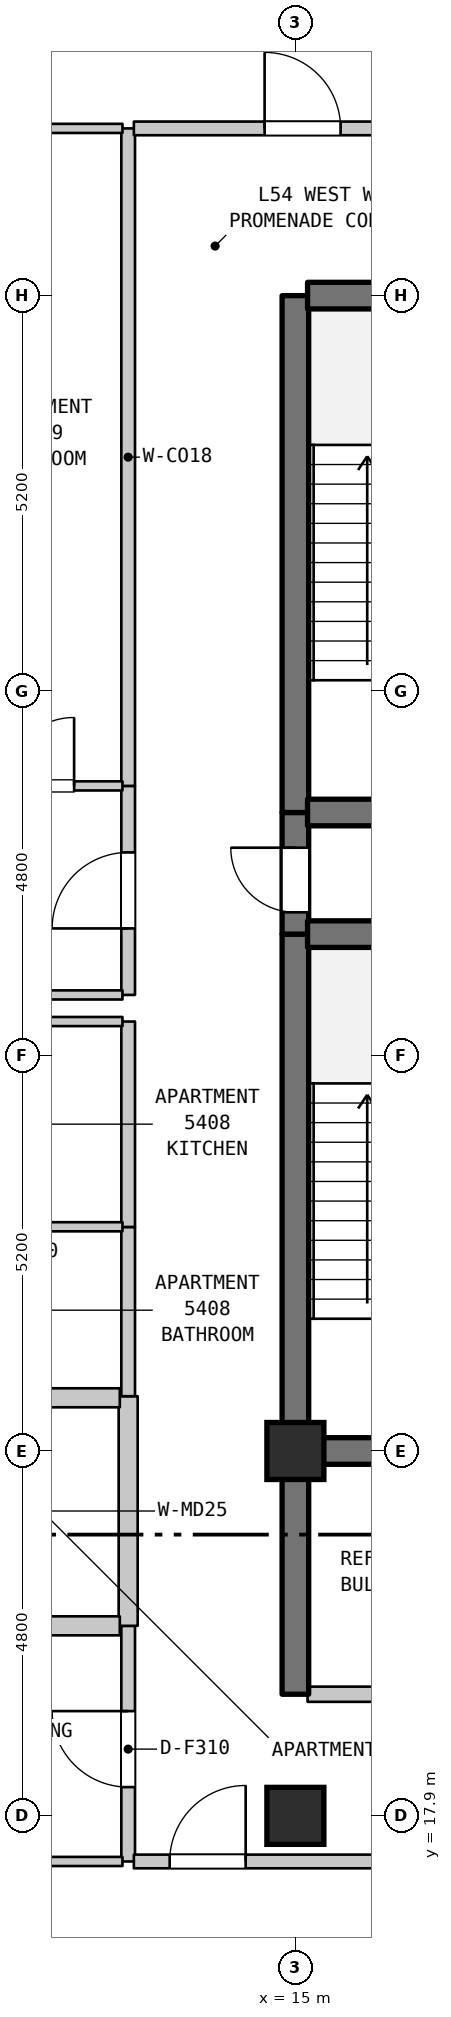
"""IFC4 building model, lengths in metres.
Left out: names, types, materials, properties, quantities, classifications, styles, units other than length and angle.
Written with IfcOpenShell. Run it as: python <this file> out.ifc"""

import sys

from ifc_helpers import new_model, si_unit, direction, frame, frame_2d, origin, origin_2d, place, context, subcontext, project, spatial, rectangle, extrude, element, fill, save


model = new_model("IFC4")
c1 = context("Model", 3, precision=1e-05, world=origin(), true_north=direction((0.0, 1.0)))
c2 = subcontext(c1, "Body", "Model", "MODEL_VIEW")
j1 = project(units=[si_unit("LENGTHUNIT", "METRE"), si_unit("PLANEANGLEUNIT", "RADIAN")], contexts=[c1])
p1 = place(None, origin())
s1 = spatial("IfcSite", under=j1, at=p1, CompositionType="ELEMENT")
p2 = place(p1, origin())
s2 = spatial("IfcBuilding", under=s1, at=p2, CompositionType="ELEMENT")
p3 = place(p2, frame((0.0, 0.0, 218.0)))
s3 = spatial("IfcBuildingStorey", under=s2, at=p3, CompositionType="ELEMENT", Elevation=218.0)
for number, where, z_axis, x_axis in (
    (1, (15.0, 17.9, 0.0), (0.0, 0.0, 1.0), (1.0, 0.0, 0.0)),
    (2, (15.0, 22.7, 0.0), (0.0, 0.0, 1.0), (1.0, 0.0, 0.0)),
):
    element("IfcColumn", number, at=place(p3, frame(where, z_axis=z_axis, x_axis=x_axis)), inside=s3, PredefinedType="COLUMN", context=c2, shape_type="SweptSolid", body=[
        extrude(rectangle(XDim=0.75, YDim=0.75, at=origin_2d()), origin(), (0.0, 0.0, 1.0), 4.8),
    ])
p4 = place(p3, frame((12.8, 17.3, 0.0), z_axis=(0.0, 0.0, 1.0), x_axis=(0.0, 1.0, 0.0)))
e3 = element("IfcWall", 3, at=p4, inside=s3, PredefinedType="STANDARD", context=c2, shape_type="SweptSolid", body=[
    extrude(rectangle(XDim=3.1, YDim=0.18, at=frame_2d((1.55, 0.0))), origin(), (0.0, 0.0, 1.0), 4.49),
])
p5 = place(p4, frame((0.978, 0.0, 0.0)))
e4 = element("IfcOpeningElement", 4, at=p5, cuts=e3, PredefinedType="OPENING", context=c2, shape_type="SweptSolid", body=[
    extrude(rectangle(XDim=1.0, YDim=2.15, at=frame_2d((0.5, 1.075))), frame((0.0, 0.1, 0.0), z_axis=(0.0, -1.0, 0.0), x_axis=(1.0, 0.0, 0.0)), (0.0, 0.0, 1.0), 0.2),
])
p6 = place(p3, frame((12.8, 20.4, 0.0), z_axis=(0.0, 0.0, 1.0), x_axis=(0.0, 1.0, 0.0)))
e5 = element("IfcWall", 5, at=p6, inside=s3, PredefinedType="STANDARD", context=c2, shape_type="SweptSolid", body=[
    extrude(rectangle(XDim=3.021, YDim=0.25, at=frame_2d((1.51, 0.0))), origin(), (0.0, 0.0, 1.0), 4.49),
])
p7 = place(p3, frame((12.8, 23.421, 0.0), z_axis=(0.0, 0.0, 1.0), x_axis=(0.0, 1.0, 0.0)))
e6 = element("IfcWall", 6, at=p7, inside=s3, PredefinedType="STANDARD", context=c2, shape_type="SweptSolid", body=[
    extrude(rectangle(XDim=2.226, YDim=0.18, at=frame_2d((1.113, 0.0))), origin(), (0.0, 0.0, 1.0), 4.49),
])
p8 = place(p3, frame((12.8, 25.647, 0.0), z_axis=(0.0, 0.0, 1.0), x_axis=(0.0, 1.0, 0.0)))
e7 = element("IfcWall", 7, at=p8, inside=s3, PredefinedType="STANDARD", context=c2, shape_type="SweptSolid", body=[
    extrude(rectangle(XDim=2.703, YDim=0.18, at=frame_2d((1.352, 0.0))), origin(), (0.0, 0.0, 1.0), 4.49),
])
p9 = place(p3, frame((12.8, 28.7, 0.0), z_axis=(0.0, 0.0, 1.0), x_axis=(0.0, 1.0, 0.0)))
e8 = element("IfcWall", 8, at=p9, inside=s3, PredefinedType="STANDARD", context=c2, shape_type="SweptSolid", body=[
    extrude(rectangle(XDim=2.75, YDim=0.18, at=frame_2d((1.375, 0.0))), origin(), (0.0, 0.0, 1.0), 4.49),
])
p10 = place(p9, frame((0.875, 0.0, 0.0)))
e9 = element("IfcOpeningElement", 9, at=p10, cuts=e8, PredefinedType="OPENING", context=c2, shape_type="SweptSolid", body=[
    extrude(rectangle(XDim=1.0, YDim=2.15, at=frame_2d((0.5, 1.075))), frame((0.0, 0.1, 0.0), z_axis=(0.0, -1.0, 0.0), x_axis=(1.0, 0.0, 0.0)), (0.0, 0.0, 1.0), 0.2),
])
p11 = place(p3, frame((12.8, 31.45, 0.0), z_axis=(0.0, 0.0, 1.0), x_axis=(0.0, 1.0, 0.0)))
e10 = element("IfcWall", 10, at=p11, inside=s3, PredefinedType="STANDARD", context=c2, shape_type="SweptSolid", body=[
    extrude(rectangle(XDim=8.65, YDim=0.18, at=frame_2d((4.325, 0.0))), origin(), (0.0, 0.0, 1.0), 4.49),
])
p12 = place(p3, frame((15.0, 19.5, 0.0), z_axis=(0.0, 0.0, 1.0), x_axis=(0.0, 1.0, 0.0)))
e11 = element("IfcWall", 11, at=p12, inside=s3, PredefinedType="SHEAR", context=c2, shape_type="SweptSolid", body=[
    extrude(rectangle(XDim=3.2, YDim=0.35, at=frame_2d((1.6, 0.0))), origin(), (0.0, 0.0, 1.0), 4.49),
])
p13 = place(p3, frame((15.0, 22.7, 0.0), z_axis=(0.0, 0.0, 1.0), x_axis=(0.0, 1.0, 0.0)))
e12 = element("IfcWall", 12, at=p13, inside=s3, PredefinedType="SHEAR", context=c2, shape_type="SweptSolid", body=[
    extrude(rectangle(XDim=6.8, YDim=0.35, at=frame_2d((3.4, 0.0))), origin(), (0.0, 0.0, 1.0), 4.49),
])
p14 = place(p3, frame((15.0, 29.5, 0.0), z_axis=(0.0, 0.0, 1.0), x_axis=(0.0, 1.0, 0.0)))
e13 = element("IfcWall", 13, at=p14, inside=s3, PredefinedType="SHEAR", context=c2, shape_type="SweptSolid", body=[
    extrude(rectangle(XDim=1.6, YDim=0.35, at=frame_2d((0.8, 0.0))), origin(), (0.0, 0.0, 1.0), 4.49),
])
p15 = place(p14, frame((0.287, 0.0, 0.0)))
e14 = element("IfcOpeningElement", 14, at=p15, cuts=e13, PredefinedType="OPENING", context=c2, shape_type="SweptSolid", body=[
    extrude(rectangle(XDim=0.85, YDim=2.1, at=frame_2d((0.425, 1.05))), frame((0.0, 0.185, 0.0), z_axis=(0.0, -1.0, 0.0), x_axis=(1.0, 0.0, 0.0)), (0.0, 0.0, 1.0), 0.37),
])
p16 = place(p3, frame((15.0, 31.1, 0.0), z_axis=(0.0, 0.0, 1.0), x_axis=(0.0, 1.0, 0.0)))
e15 = element("IfcWall", 15, at=p16, inside=s3, PredefinedType="SHEAR", context=c2, shape_type="SweptSolid", body=[
    extrude(rectangle(XDim=6.8, YDim=0.35, at=frame_2d((3.4, 0.0))), origin(), (0.0, 0.0, 1.0), 4.49),
])
p17 = place(p3, frame((9.085, 17.3, 0.0), z_axis=(0.0, 0.0, 1.0), x_axis=(1.0, 0.0, 0.0)))
e16 = element("IfcWall", 16, at=p17, inside=s3, PredefinedType="PARTITIONING", context=c2, shape_type="SweptSolid", body=[
    extrude(rectangle(XDim=3.64, YDim=0.12, at=frame_2d((1.82, 0.0))), origin(), (0.0, 0.0, 1.0), 4.49),
])
p18 = place(p3, frame((12.875, 17.3, 0.0), z_axis=(0.0, 0.0, 1.0), x_axis=(1.0, 0.0, 0.0)))
e17 = element("IfcWall", 17, at=p18, inside=s3, PredefinedType="STANDARD", context=c2, shape_type="SweptSolid", body=[
    extrude(rectangle(XDim=3.28, YDim=0.18, at=frame_2d((1.64, 0.0))), origin(), (0.0, 0.0, 1.0), 4.49),
])
p19 = place(p18, frame((0.471, 0.0, 0.0)))
e18 = element("IfcOpeningElement", 18, at=p19, cuts=e17, PredefinedType="OPENING", context=c2, shape_type="SweptSolid", body=[
    extrude(rectangle(XDim=1.0, YDim=2.15, at=frame_2d((0.5, 1.075))), frame((0.0, 0.1, 0.0), z_axis=(0.0, -1.0, 0.0), x_axis=(1.0, 0.0, 0.0)), (0.0, 0.0, 1.0), 0.2),
])
p20 = place(p3, frame((15.16, 19.5, 0.0), z_axis=(0.0, 0.0, 1.0), x_axis=(1.0, 0.0, 0.0)))
e19 = element("IfcWall", 19, at=p20, inside=s3, PredefinedType="STANDARD", context=c2, shape_type="SweptSolid", body=[
    extrude(rectangle(XDim=3.68, YDim=0.2, at=frame_2d((1.84, 0.0))), origin(), (0.0, 0.0, 1.0), 4.49),
])
p21 = place(p20, frame((1.39, 0.0, 0.0)))
e20 = element("IfcOpeningElement", 20, at=p21, cuts=e19, PredefinedType="OPENING", context=c2, shape_type="SweptSolid", body=[
    extrude(rectangle(XDim=0.9, YDim=2.15, at=frame_2d((0.45, 1.075))), frame((0.0, 0.11, 0.0), z_axis=(0.0, -1.0, 0.0), x_axis=(1.0, 0.0, 0.0)), (0.0, 0.0, 1.0), 0.22),
])
p22 = place(p3, frame((10.66, 20.4, 0.0), z_axis=(0.0, 0.0, 1.0), x_axis=(1.0, 0.0, 0.0)))
e21 = element("IfcWall", 21, at=p22, inside=s3, PredefinedType="STANDARD", context=c2, shape_type="SweptSolid", body=[
    extrude(rectangle(XDim=2.03, YDim=0.25, at=frame_2d((1.015, 0.0))), origin(), (0.0, 0.0, 1.0), 4.49),
])
p23 = place(p3, frame((15.16, 22.7, 0.0), z_axis=(0.0, 0.0, 1.0), x_axis=(1.0, 0.0, 0.0)))
e22 = element("IfcWall", 22, at=p23, inside=s3, PredefinedType="SHEAR", context=c2, shape_type="SweptSolid", body=[
    extrude(rectangle(XDim=3.68, YDim=0.35, at=frame_2d((1.84, 0.0))), origin(), (0.0, 0.0, 1.0), 4.49),
])
p24 = place(p3, frame((10.66, 23.4, 0.0), z_axis=(0.0, 0.0, 1.0), x_axis=(1.0, 0.0, 0.0)))
e23 = element("IfcWall", 23, at=p24, inside=s3, PredefinedType="STANDARD", context=c2, shape_type="SweptSolid", body=[
    extrude(rectangle(XDim=2.03, YDim=0.25, at=frame_2d((1.015, 0.0))), origin(), (0.0, 0.0, 1.0), 4.49),
])
for number, where, z_axis, x_axis in (
    (24, (10.595, 25.65, 0.0), (0.0, 0.0, 1.0), (1.0, 0.0, 0.0)),
    (25, (10.595, 28.35, 0.0), (0.0, 0.0, 1.0), (1.0, 0.0, 0.0)),
):
    element("IfcWall", number, at=place(p3, frame(where, z_axis=z_axis, x_axis=x_axis)), inside=s3, PredefinedType="PARTITIONING", context=c2, shape_type="SweptSolid", body=[
        extrude(rectangle(XDim=2.13, YDim=0.12, at=frame_2d((1.065, 0.0))), origin(), (0.0, 0.0, 1.0), 4.49),
    ])
p25 = place(p3, frame((9.03, 28.7, 0.0), z_axis=(0.0, 0.0, 1.0), x_axis=(1.0, 0.0, 0.0)))
e26 = element("IfcWall", 26, at=p25, inside=s3, PredefinedType="PARTITIONING", context=c2, shape_type="SweptSolid", body=[
    extrude(rectangle(XDim=3.695, YDim=0.12, at=frame_2d((1.848, 0.0))), origin(), (0.0, 0.0, 1.0), 4.49),
])
for number, where, z_axis, x_axis in (
    (27, (15.16, 29.5, 0.0), (0.0, 0.0, 1.0), (1.0, 0.0, 0.0)),
    (28, (15.16, 31.1, 0.0), (0.0, 0.0, 1.0), (1.0, 0.0, 0.0)),
):
    element("IfcWall", number, at=place(p3, frame(where, z_axis=z_axis, x_axis=x_axis)), inside=s3, PredefinedType="SHEAR", context=c2, shape_type="SweptSolid", body=[
        extrude(rectangle(XDim=3.68, YDim=0.35, at=frame_2d((1.84, 0.0))), origin(), (0.0, 0.0, 1.0), 4.49),
    ])
p26 = place(p3, frame((10.523, 31.45, 0.0), z_axis=(0.0, 0.0, 1.0), x_axis=(1.0, 0.0, 0.0)))
e29 = element("IfcWall", 29, at=p26, inside=s3, PredefinedType="PARTITIONING", context=c2, shape_type="SweptSolid", body=[
    extrude(rectangle(XDim=2.202, YDim=0.12, at=frame_2d((1.101, 0.0))), origin(), (0.0, 0.0, 1.0), 4.49),
])
p27 = place(p26, frame((0.666, 0.0, 0.0)))
e30 = element("IfcOpeningElement", 30, at=p27, cuts=e29, PredefinedType="OPENING", context=c2, shape_type="SweptSolid", body=[
    extrude(rectangle(XDim=0.9, YDim=2.1, at=frame_2d((0.45, 1.05))), frame((0.0, 0.07, 0.0), z_axis=(0.0, -1.0, 0.0), x_axis=(1.0, 0.0, 0.0)), (0.0, 0.0, 1.0), 0.14),
])
p28 = place(p3, frame((15.16, 37.9, 0.0), z_axis=(0.0, 0.0, 1.0), x_axis=(1.0, 0.0, 0.0)))
e31 = element("IfcWall", 31, at=p28, inside=s3, PredefinedType="SHEAR", context=c2, shape_type="SweptSolid", body=[
    extrude(rectangle(XDim=3.68, YDim=0.35, at=frame_2d((1.84, 0.0))), origin(), (0.0, 0.0, 1.0), 4.49),
])
p29 = place(p3, frame((10.523, 40.1, 0.0), z_axis=(0.0, 0.0, 1.0), x_axis=(1.0, 0.0, 0.0)))
e32 = element("IfcWall", 32, at=p29, inside=s3, PredefinedType="PARTITIONING", context=c2, shape_type="SweptSolid", body=[
    extrude(rectangle(XDim=2.202, YDim=0.12, at=frame_2d((1.101, 0.0))), origin(), (0.0, 0.0, 1.0), 4.49),
])
p30 = place(p3, frame((12.875, 40.1, 0.0), z_axis=(0.0, 0.0, 1.0), x_axis=(1.0, 0.0, 0.0)))
e33 = element("IfcWall", 33, at=p30, inside=s3, PredefinedType="STANDARD", context=c2, shape_type="SweptSolid", body=[
    extrude(rectangle(XDim=4.61, YDim=0.18, at=frame_2d((2.305, 0.0))), origin(), (0.0, 0.0, 1.0), 4.49),
])
p31 = place(p30, frame((1.72, 0.0, 0.0)))
e34 = element("IfcOpeningElement", 34, at=p31, cuts=e33, PredefinedType="OPENING", context=c2, shape_type="SweptSolid", body=[
    extrude(rectangle(XDim=1.0, YDim=2.15, at=frame_2d((0.5, 1.075))), frame((0.0, 0.1, 0.0), z_axis=(0.0, -1.0, 0.0), x_axis=(1.0, 0.0, 0.0)), (0.0, 0.0, 1.0), 0.2),
])
p32 = place(p5, origin())
e35 = element("IfcDoor", 35, at=p32, inside=s3, OperationType="SINGLE_SWING_RIGHT", PredefinedType="DOOR", context=c2, shape_type="SweptSolid", body=[
    extrude(rectangle(XDim=1.0, YDim=2.15, at=frame_2d((0.5, 1.075))), frame((0.0, 0.025, 0.0), z_axis=(0.0, -1.0, 0.0), x_axis=(1.0, 0.0, 0.0)), (0.0, 0.0, 1.0), 0.05),
])
fill(e4, e35)
p33 = place(p10, origin())
e36 = element("IfcDoor", 36, at=p33, inside=s3, OperationType="SINGLE_SWING_LEFT", PredefinedType="DOOR", context=c2, shape_type="SweptSolid", body=[
    extrude(rectangle(XDim=1.0, YDim=2.15, at=frame_2d((0.5, 1.075))), frame((0.0, 0.025, 0.0), z_axis=(0.0, -1.0, 0.0), x_axis=(1.0, 0.0, 0.0)), (0.0, 0.0, 1.0), 0.05),
])
fill(e9, e36)
p34 = place(p15, origin())
e37 = element("IfcDoor", 37, at=p34, inside=s3, OperationType="SINGLE_SWING_RIGHT", PredefinedType="DOOR", context=c2, shape_type="SweptSolid", body=[
    extrude(rectangle(XDim=0.85, YDim=2.1, at=frame_2d((0.425, 1.05))), frame((0.0, 0.025, 0.0), z_axis=(0.0, -1.0, 0.0), x_axis=(1.0, 0.0, 0.0)), (0.0, 0.0, 1.0), 0.05),
])
fill(e14, e37)
p35 = place(p19, origin())
e38 = element("IfcDoor", 38, at=p35, inside=s3, OperationType="SINGLE_SWING_RIGHT", PredefinedType="DOOR", context=c2, shape_type="SweptSolid", body=[
    extrude(rectangle(XDim=1.0, YDim=2.15, at=frame_2d((0.5, 1.075))), frame((0.0, 0.025, 0.0), z_axis=(0.0, -1.0, 0.0), x_axis=(1.0, 0.0, 0.0)), (0.0, 0.0, 1.0), 0.05),
])
fill(e18, e38)
p36 = place(p27, origin())
e39 = element("IfcDoor", 39, at=p36, inside=s3, OperationType="SINGLE_SWING_RIGHT", PredefinedType="DOOR", context=c2, shape_type="SweptSolid", body=[
    extrude(rectangle(XDim=0.9, YDim=2.1, at=frame_2d((0.45, 1.05))), frame((0.0, 0.025, 0.0), z_axis=(0.0, -1.0, 0.0), x_axis=(1.0, 0.0, 0.0)), (0.0, 0.0, 1.0), 0.05),
])
fill(e30, e39)
p37 = place(p31, origin())
e40 = element("IfcDoor", 40, at=p37, inside=s3, OperationType="SINGLE_SWING_LEFT", PredefinedType="DOOR", context=c2, shape_type="SweptSolid", body=[
    extrude(rectangle(XDim=1.0, YDim=2.15, at=frame_2d((0.5, 1.075))), frame((0.0, 0.025, 0.0), z_axis=(0.0, -1.0, 0.0), x_axis=(1.0, 0.0, 0.0)), (0.0, 0.0, 1.0), 0.05),
])
fill(e34, e40)
save(model, sys.argv[1])
